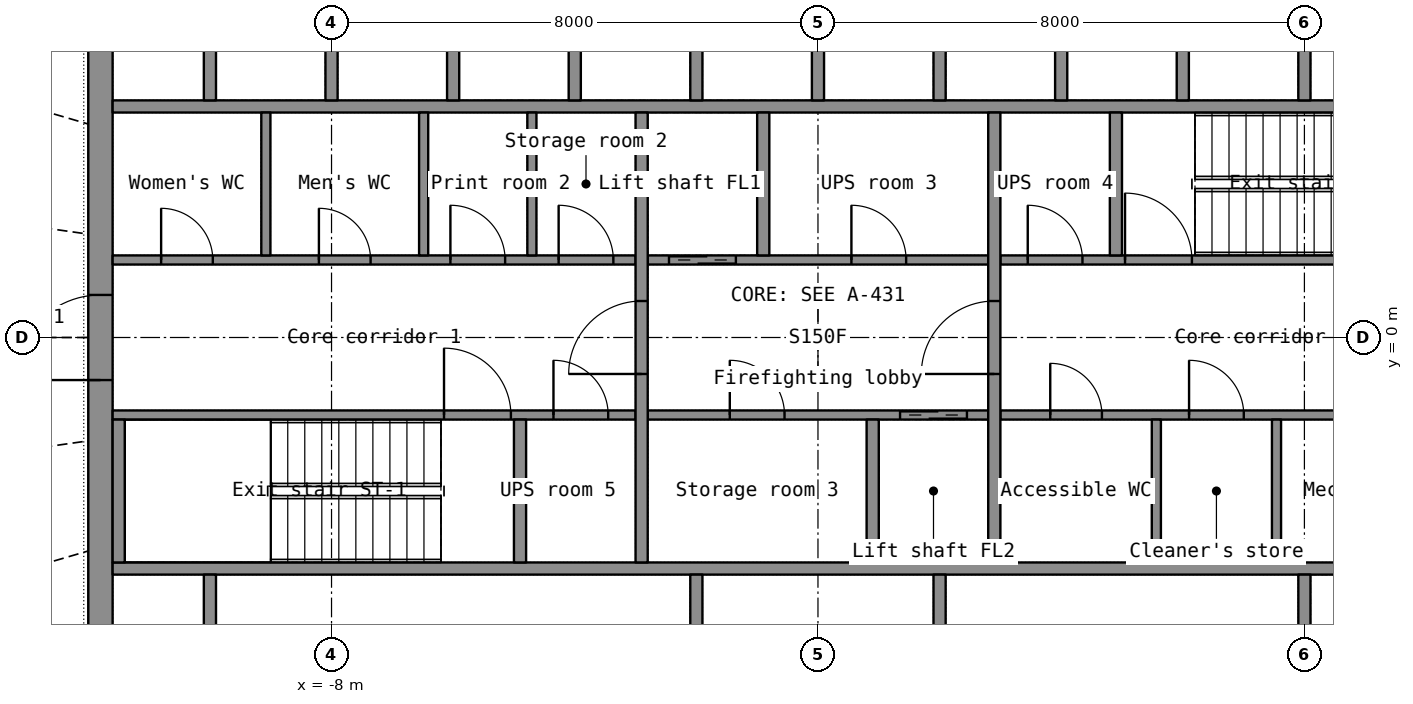
"""IFC4 building model, lengths in metres.
Left out: names, types, materials, properties, quantities, classifications, styles, units other than length and angle.
Written with IfcOpenShell. Run it as: python <this file> out.ifc"""

import sys

from ifc_helpers import new_model, si_unit, direction, frame, frame_2d, origin, place, context, subcontext, project, spatial, rectangle, extrude, element, fill, save


model = new_model("IFC4")
c1 = context("Model", 3, precision=1e-05, world=origin(), true_north=direction((0.0, 1.0)))
c2 = subcontext(c1, "Body", "Model", "MODEL_VIEW")
j1 = project(units=[si_unit("LENGTHUNIT", "METRE"), si_unit("PLANEANGLEUNIT", "RADIAN")], contexts=[c1])
p1 = place(None, origin())
s1 = spatial("IfcSite", under=j1, at=p1, CompositionType="ELEMENT")
p2 = place(p1, origin())
s2 = spatial("IfcBuilding", under=s1, at=p2, CompositionType="ELEMENT")
p3 = place(p2, frame((0.0, 0.0, 243.0)))
s3 = spatial("IfcBuildingStorey", under=s2, at=p3, CompositionType="ELEMENT", Elevation=243.0)
p4 = place(p3, frame((-11.8, -7.2, 0.0), z_axis=(0.0, 0.0, 1.0), x_axis=(0.0, 1.0, 0.0)))
e1 = element("IfcWall", 1, at=p4, inside=s3, PredefinedType="SHEAR", context=c2, shape_type="SweptSolid", body=[
    extrude(rectangle(XDim=14.4, YDim=0.4, at=frame_2d((7.2, 0.0))), origin(), (0.0, 0.0, 1.0), 3.3),
])
p5 = place(p4, frame((6.5, 0.0, 0.0)))
e2 = element("IfcOpeningElement", 2, at=p5, cuts=e1, PredefinedType="OPENING", context=c2, shape_type="SweptSolid", body=[
    extrude(rectangle(XDim=1.4, YDim=2.2, at=frame_2d((0.7, 1.1))), frame((0.0, 0.21, 0.0), z_axis=(0.0, -1.0, 0.0), x_axis=(1.0, 0.0, 0.0)), (0.0, 0.0, 1.0), 0.42),
])
for number, where, z_axis, x_axis in (
    (3, (-11.6, -3.8, 0.0), (0.0, 0.0, 1.0), (1.0, 0.0, 0.0)),
    (4, (-11.6, 3.8, 0.0), (0.0, 0.0, 1.0), (1.0, 0.0, 0.0)),
):
    element("IfcWall", number, at=place(p3, frame(where, z_axis=z_axis, x_axis=x_axis)), inside=s3, PredefinedType="SHEAR", context=c2, shape_type="SweptSolid", body=[
        extrude(rectangle(XDim=23.2, YDim=0.2, at=frame_2d((11.6, 0.0))), origin(), (0.0, 0.0, 1.0), 3.3),
    ])
for number, where, z_axis, x_axis in (
    (5, (-10.0, -6.8, 0.0), (0.0, 0.0, 1.0), (0.0, 1.0, 0.0)),
    (6, (8.0, -6.8, 0.0), (0.0, 0.0, 1.0), (0.0, 1.0, 0.0)),
):
    element("IfcWall", number, at=place(p3, frame(where, z_axis=z_axis, x_axis=x_axis)), inside=s3, PredefinedType="SHEAR", context=c2, shape_type="SweptSolid", body=[
        extrude(rectangle(XDim=2.9, YDim=0.2, at=frame_2d((1.45, 0.0))), origin(), (0.0, 0.0, 1.0), 3.3),
    ])
for number, where, z_axis, x_axis in (
    (7, (-2.0, -6.8, 0.0), (0.0, 0.0, 1.0), (0.0, 1.0, 0.0)),
    (8, (2.0, -6.8, 0.0), (0.0, 0.0, 1.0), (0.0, 1.0, 0.0)),
):
    element("IfcWall", number, at=place(p3, frame(where, z_axis=z_axis, x_axis=x_axis)), inside=s3, PredefinedType="PARTITIONING", context=c2, shape_type="SweptSolid", body=[
        extrude(rectangle(XDim=2.9, YDim=0.2, at=frame_2d((1.45, 0.0))), origin(), (0.0, 0.0, 1.0), 3.3),
    ])
for number, where, z_axis, x_axis in (
    (9, (-10.0, 3.9, 0.0), (0.0, 0.0, 1.0), (0.0, 1.0, 0.0)),
    (10, (-8.0, 3.9, 0.0), (0.0, 0.0, 1.0), (0.0, 1.0, 0.0)),
    (11, (-6.0, 3.9, 0.0), (0.0, 0.0, 1.0), (0.0, 1.0, 0.0)),
    (12, (-4.0, 3.9, 0.0), (0.0, 0.0, 1.0), (0.0, 1.0, 0.0)),
    (13, (-2.0, 3.9, 0.0), (0.0, 0.0, 1.0), (0.0, 1.0, 0.0)),
    (14, (0.0, 3.9, 0.0), (0.0, 0.0, 1.0), (0.0, 1.0, 0.0)),
    (15, (2.0, 3.9, 0.0), (0.0, 0.0, 1.0), (0.0, 1.0, 0.0)),
    (16, (4.0, 3.9, 0.0), (0.0, 0.0, 1.0), (0.0, 1.0, 0.0)),
    (17, (6.0, 3.9, 0.0), (0.0, 0.0, 1.0), (0.0, 1.0, 0.0)),
    (18, (8.0, 3.9, 0.0), (0.0, 0.0, 1.0), (0.0, 1.0, 0.0)),
):
    element("IfcWall", number, at=place(p3, frame(where, z_axis=z_axis, x_axis=x_axis)), inside=s3, PredefinedType="SHEAR", context=c2, shape_type="SweptSolid", body=[
        extrude(rectangle(XDim=2.9, YDim=0.2, at=frame_2d((1.45, 0.0))), origin(), (0.0, 0.0, 1.0), 3.3),
    ])
p6 = place(p3, frame((-11.6, -1.275, 0.0), z_axis=(0.0, 0.0, 1.0), x_axis=(1.0, 0.0, 0.0)))
e19 = element("IfcWall", 19, at=p6, inside=s3, PredefinedType="SHEAR", context=c2, shape_type="SweptSolid", body=[
    extrude(rectangle(XDim=8.6, YDim=0.15, at=frame_2d((4.3, 0.0))), origin(), (0.0, 0.0, 1.0), 3.3),
])
p7 = place(p6, frame((5.45, 0.0, 0.0)))
e20 = element("IfcOpeningElement", 20, at=p7, cuts=e19, PredefinedType="OPENING", context=c2, shape_type="SweptSolid", body=[
    extrude(rectangle(XDim=1.1, YDim=2.15, at=frame_2d((0.55, 1.075))), frame((0.0, 0.085, 0.0), z_axis=(0.0, -1.0, 0.0), x_axis=(1.0, 0.0, 0.0)), (0.0, 0.0, 1.0), 0.17),
])
p8 = place(p6, frame((7.25, 0.0, 0.0)))
e21 = element("IfcOpeningElement", 21, at=p8, cuts=e19, PredefinedType="OPENING", context=c2, shape_type="SweptSolid", body=[
    extrude(rectangle(XDim=0.9, YDim=2.1, at=frame_2d((0.45, 1.05))), frame((0.0, 0.085, 0.0), z_axis=(0.0, -1.0, 0.0), x_axis=(1.0, 0.0, 0.0)), (0.0, 0.0, 1.0), 0.17),
])
p9 = place(p3, frame((-2.8, -1.275, 0.0), z_axis=(0.0, 0.0, 1.0), x_axis=(1.0, 0.0, 0.0)))
e22 = element("IfcWall", 22, at=p9, inside=s3, PredefinedType="SHEAR", context=c2, shape_type="SweptSolid", body=[
    extrude(rectangle(XDim=5.6, YDim=0.15, at=frame_2d((2.8, 0.0))), origin(), (0.0, 0.0, 1.0), 3.3),
])
p10 = place(p9, frame((4.15, 0.0, 0.0)))
e23 = element("IfcOpeningElement", 23, at=p10, cuts=e22, PredefinedType="OPENING", context=c2, shape_type="SweptSolid", body=[
    extrude(rectangle(XDim=1.1, YDim=2.2, at=frame_2d((0.55, 1.1))), frame((0.0, 0.085, 0.0), z_axis=(0.0, -1.0, 0.0), x_axis=(1.0, 0.0, 0.0)), (0.0, 0.0, 1.0), 0.17),
])
p11 = place(p9, frame((1.35, 0.0, 0.0)))
e24 = element("IfcOpeningElement", 24, at=p11, cuts=e22, PredefinedType="OPENING", context=c2, shape_type="SweptSolid", body=[
    extrude(rectangle(XDim=0.9, YDim=2.1, at=frame_2d((0.45, 1.05))), frame((0.0, 0.085, 0.0), z_axis=(0.0, -1.0, 0.0), x_axis=(1.0, 0.0, 0.0)), (0.0, 0.0, 1.0), 0.17),
])
p12 = place(p3, frame((3.0, -1.275, 0.0), z_axis=(0.0, 0.0, 1.0), x_axis=(1.0, 0.0, 0.0)))
e25 = element("IfcWall", 25, at=p12, inside=s3, PredefinedType="PARTITIONING", context=c2, shape_type="SweptSolid", body=[
    extrude(rectangle(XDim=8.6, YDim=0.15, at=frame_2d((4.3, 0.0))), origin(), (0.0, 0.0, 1.0), 3.3),
])
p13 = place(p12, frame((0.82, 0.0, 0.0)))
e26 = element("IfcOpeningElement", 26, at=p13, cuts=e25, PredefinedType="OPENING", context=c2, shape_type="SweptSolid", body=[
    extrude(rectangle(XDim=0.85, YDim=2.1, at=frame_2d((0.425, 1.05))), frame((0.0, 0.085, 0.0), z_axis=(0.0, -1.0, 0.0), x_axis=(1.0, 0.0, 0.0)), (0.0, 0.0, 1.0), 0.17),
])
p14 = place(p12, frame((3.103, 0.0, 0.0)))
e27 = element("IfcOpeningElement", 27, at=p14, cuts=e25, PredefinedType="OPENING", context=c2, shape_type="SweptSolid", body=[
    extrude(rectangle(XDim=0.9, YDim=2.1, at=frame_2d((0.45, 1.05))), frame((0.0, 0.085, 0.0), z_axis=(0.0, -1.0, 0.0), x_axis=(1.0, 0.0, 0.0)), (0.0, 0.0, 1.0), 0.17),
])
p15 = place(p12, frame((6.158, 0.0, 0.0)))
e28 = element("IfcOpeningElement", 28, at=p15, cuts=e25, PredefinedType="OPENING", context=c2, shape_type="SweptSolid", body=[
    extrude(rectangle(XDim=0.9, YDim=2.1, at=frame_2d((0.45, 1.05))), frame((0.0, 0.085, 0.0), z_axis=(0.0, -1.0, 0.0), x_axis=(1.0, 0.0, 0.0)), (0.0, 0.0, 1.0), 0.17),
])
p16 = place(p3, frame((-11.6, 1.275, 0.0), z_axis=(0.0, 0.0, 1.0), x_axis=(1.0, 0.0, 0.0)))
e29 = element("IfcWall", 29, at=p16, inside=s3, PredefinedType="PARTITIONING", context=c2, shape_type="SweptSolid", body=[
    extrude(rectangle(XDim=8.6, YDim=0.15, at=frame_2d((4.3, 0.0))), origin(), (0.0, 0.0, 1.0), 3.3),
])
p17 = place(p16, frame((0.798, 0.0, 0.0)))
e30 = element("IfcOpeningElement", 30, at=p17, cuts=e29, PredefinedType="OPENING", context=c2, shape_type="SweptSolid", body=[
    extrude(rectangle(XDim=0.85, YDim=2.1, at=frame_2d((0.425, 1.05))), frame((0.0, 0.085, 0.0), z_axis=(0.0, -1.0, 0.0), x_axis=(1.0, 0.0, 0.0)), (0.0, 0.0, 1.0), 0.17),
])
p18 = place(p16, frame((3.393, 0.0, 0.0)))
e31 = element("IfcOpeningElement", 31, at=p18, cuts=e29, PredefinedType="OPENING", context=c2, shape_type="SweptSolid", body=[
    extrude(rectangle(XDim=0.85, YDim=2.1, at=frame_2d((0.425, 1.05))), frame((0.0, 0.085, 0.0), z_axis=(0.0, -1.0, 0.0), x_axis=(1.0, 0.0, 0.0)), (0.0, 0.0, 1.0), 0.17),
])
p19 = place(p16, frame((5.555, 0.0, 0.0)))
e32 = element("IfcOpeningElement", 32, at=p19, cuts=e29, PredefinedType="OPENING", context=c2, shape_type="SweptSolid", body=[
    extrude(rectangle(XDim=0.9, YDim=2.1, at=frame_2d((0.45, 1.05))), frame((0.0, 0.085, 0.0), z_axis=(0.0, -1.0, 0.0), x_axis=(1.0, 0.0, 0.0)), (0.0, 0.0, 1.0), 0.17),
])
p20 = place(p16, frame((7.335, 0.0, 0.0)))
e33 = element("IfcOpeningElement", 33, at=p20, cuts=e29, PredefinedType="OPENING", context=c2, shape_type="SweptSolid", body=[
    extrude(rectangle(XDim=0.9, YDim=2.1, at=frame_2d((0.45, 1.05))), frame((0.0, 0.085, 0.0), z_axis=(0.0, -1.0, 0.0), x_axis=(1.0, 0.0, 0.0)), (0.0, 0.0, 1.0), 0.17),
])
p21 = place(p3, frame((-2.8, 1.275, 0.0), z_axis=(0.0, 0.0, 1.0), x_axis=(1.0, 0.0, 0.0)))
e34 = element("IfcWall", 34, at=p21, inside=s3, PredefinedType="SHEAR", context=c2, shape_type="SweptSolid", body=[
    extrude(rectangle(XDim=5.6, YDim=0.15, at=frame_2d((2.8, 0.0))), origin(), (0.0, 0.0, 1.0), 3.3),
])
p22 = place(p21, frame((0.35, 0.0, 0.0)))
e35 = element("IfcOpeningElement", 35, at=p22, cuts=e34, PredefinedType="OPENING", context=c2, shape_type="SweptSolid", body=[
    extrude(rectangle(XDim=1.1, YDim=2.2, at=frame_2d((0.55, 1.1))), frame((0.0, 0.085, 0.0), z_axis=(0.0, -1.0, 0.0), x_axis=(1.0, 0.0, 0.0)), (0.0, 0.0, 1.0), 0.17),
])
p23 = place(p21, frame((3.35, 0.0, 0.0)))
e36 = element("IfcOpeningElement", 36, at=p23, cuts=e34, PredefinedType="OPENING", context=c2, shape_type="SweptSolid", body=[
    extrude(rectangle(XDim=0.9, YDim=2.1, at=frame_2d((0.45, 1.05))), frame((0.0, 0.085, 0.0), z_axis=(0.0, -1.0, 0.0), x_axis=(1.0, 0.0, 0.0)), (0.0, 0.0, 1.0), 0.17),
])
p24 = place(p3, frame((3.0, 1.275, 0.0), z_axis=(0.0, 0.0, 1.0), x_axis=(1.0, 0.0, 0.0)))
e37 = element("IfcWall", 37, at=p24, inside=s3, PredefinedType="SHEAR", context=c2, shape_type="SweptSolid", body=[
    extrude(rectangle(XDim=8.6, YDim=0.15, at=frame_2d((4.3, 0.0))), origin(), (0.0, 0.0, 1.0), 3.3),
])
p25 = place(p24, frame((2.05, 0.0, 0.0)))
e38 = element("IfcOpeningElement", 38, at=p25, cuts=e37, PredefinedType="OPENING", context=c2, shape_type="SweptSolid", body=[
    extrude(rectangle(XDim=1.1, YDim=2.15, at=frame_2d((0.55, 1.075))), frame((0.0, 0.085, 0.0), z_axis=(0.0, -1.0, 0.0), x_axis=(1.0, 0.0, 0.0)), (0.0, 0.0, 1.0), 0.17),
])
p26 = place(p24, frame((0.45, 0.0, 0.0)))
e39 = element("IfcOpeningElement", 39, at=p26, cuts=e37, PredefinedType="OPENING", context=c2, shape_type="SweptSolid", body=[
    extrude(rectangle(XDim=0.9, YDim=2.1, at=frame_2d((0.45, 1.05))), frame((0.0, 0.085, 0.0), z_axis=(0.0, -1.0, 0.0), x_axis=(1.0, 0.0, 0.0)), (0.0, 0.0, 1.0), 0.17),
])
p27 = place(p3, frame((-2.9, -3.7, 0.0), z_axis=(0.0, 0.0, 1.0), x_axis=(0.0, 1.0, 0.0)))
e40 = element("IfcWall", 40, at=p27, inside=s3, PredefinedType="SHEAR", context=c2, shape_type="SweptSolid", body=[
    extrude(rectangle(XDim=7.4, YDim=0.2, at=frame_2d((3.7, 0.0))), origin(), (0.0, 0.0, 1.0), 3.3),
])
p28 = place(p27, frame((3.1, 0.0, 0.0)))
e41 = element("IfcOpeningElement", 41, at=p28, cuts=e40, PredefinedType="OPENING", context=c2, shape_type="SweptSolid", body=[
    extrude(rectangle(XDim=1.2, YDim=2.2, at=frame_2d((0.6, 1.1))), frame((0.0, 0.11, 0.0), z_axis=(0.0, -1.0, 0.0), x_axis=(1.0, 0.0, 0.0)), (0.0, 0.0, 1.0), 0.22),
])
p29 = place(p3, frame((2.9, -3.7, 0.0), z_axis=(0.0, 0.0, 1.0), x_axis=(0.0, 1.0, 0.0)))
e42 = element("IfcWall", 42, at=p29, inside=s3, PredefinedType="SHEAR", context=c2, shape_type="SweptSolid", body=[
    extrude(rectangle(XDim=7.4, YDim=0.2, at=frame_2d((3.7, 0.0))), origin(), (0.0, 0.0, 1.0), 3.3),
])
p30 = place(p29, frame((3.1, 0.0, 0.0)))
e43 = element("IfcOpeningElement", 43, at=p30, cuts=e42, PredefinedType="OPENING", context=c2, shape_type="SweptSolid", body=[
    extrude(rectangle(XDim=1.2, YDim=2.2, at=frame_2d((0.6, 1.1))), frame((0.0, 0.11, 0.0), z_axis=(0.0, -1.0, 0.0), x_axis=(1.0, 0.0, 0.0)), (0.0, 0.0, 1.0), 0.22),
])
for number, where, z_axis, x_axis in (
    (44, (-0.9, 1.35, 0.0), (0.0, 0.0, 1.0), (0.0, 1.0, 0.0)),
    (45, (0.9, -3.7, 0.0), (0.0, 0.0, 1.0), (0.0, 1.0, 0.0)),
    (46, (-11.5, -3.7, 0.0), (0.0, 0.0, 1.0), (0.0, 1.0, 0.0)),
    (47, (-4.9, -3.7, 0.0), (0.0, 0.0, 1.0), (0.0, 1.0, 0.0)),
    (48, (4.9, 1.35, 0.0), (0.0, 0.0, 1.0), (0.0, 1.0, 0.0)),
):
    element("IfcWall", number, at=place(p3, frame(where, z_axis=z_axis, x_axis=x_axis)), inside=s3, PredefinedType="SHEAR", context=c2, shape_type="SweptSolid", body=[
        extrude(rectangle(XDim=2.35, YDim=0.2, at=frame_2d((1.175, 0.0))), origin(), (0.0, 0.0, 1.0), 3.3),
    ])
for number, where, z_axis, x_axis in (
    (49, (-9.08, 1.35, 0.0), (0.0, 0.0, 1.0), (0.0, 1.0, 0.0)),
    (50, (-6.485, 1.35, 0.0), (0.0, 0.0, 1.0), (0.0, 1.0, 0.0)),
    (51, (-4.705, 1.35, 0.0), (0.0, 0.0, 1.0), (0.0, 1.0, 0.0)),
    (52, (5.565, -3.7, 0.0), (0.0, 0.0, 1.0), (0.0, 1.0, 0.0)),
    (53, (7.541, -3.7, 0.0), (0.0, 0.0, 1.0), (0.0, 1.0, 0.0)),
):
    element("IfcWall", number, at=place(p3, frame(where, z_axis=z_axis, x_axis=x_axis)), inside=s3, PredefinedType="PARTITIONING", context=c2, shape_type="SweptSolid", body=[
        extrude(rectangle(XDim=2.35, YDim=0.15, at=frame_2d((1.175, 0.0))), origin(), (0.0, 0.0, 1.0), 3.3),
    ])
p31 = place(p5, origin())
e54 = element("IfcDoor", 54, at=p31, inside=s3, OperationType="DOUBLE_DOOR_SINGLE_SWING", PredefinedType="DOOR", context=c2, shape_type="SweptSolid", body=[
    extrude(rectangle(XDim=1.4, YDim=2.2, at=frame_2d((0.7, 1.1))), frame((0.0, 0.025, 0.0), z_axis=(0.0, -1.0, 0.0), x_axis=(1.0, 0.0, 0.0)), (0.0, 0.0, 1.0), 0.05),
])
fill(e2, e54)
p32 = place(p28, origin())
e55 = element("IfcDoor", 55, at=p32, inside=s3, OperationType="SINGLE_SWING_LEFT", PredefinedType="DOOR", context=c2, shape_type="SweptSolid", body=[
    extrude(rectangle(XDim=1.2, YDim=2.2, at=frame_2d((0.6, 1.1))), frame((0.0, 0.025, 0.0), z_axis=(0.0, -1.0, 0.0), x_axis=(1.0, 0.0, 0.0)), (0.0, 0.0, 1.0), 0.05),
])
fill(e41, e55)
p33 = place(p30, origin())
e56 = element("IfcDoor", 56, at=p33, inside=s3, OperationType="SINGLE_SWING_LEFT", PredefinedType="DOOR", context=c2, shape_type="SweptSolid", body=[
    extrude(rectangle(XDim=1.2, YDim=2.2, at=frame_2d((0.6, 1.1))), frame((0.0, 0.025, 0.0), z_axis=(0.0, -1.0, 0.0), x_axis=(1.0, 0.0, 0.0)), (0.0, 0.0, 1.0), 0.05),
])
fill(e43, e56)
p34 = place(p22, origin())
e57 = element("IfcDoor", 57, at=p34, inside=s3, OperationType="DOUBLE_DOOR_SLIDING", PredefinedType="DOOR", context=c2, shape_type="SweptSolid", body=[
    extrude(rectangle(XDim=1.1, YDim=2.2, at=frame_2d((0.55, 1.1))), frame((0.0, 0.025, 0.0), z_axis=(0.0, -1.0, 0.0), x_axis=(1.0, 0.0, 0.0)), (0.0, 0.0, 1.0), 0.05),
])
fill(e35, e57)
p35 = place(p10, origin())
e58 = element("IfcDoor", 58, at=p35, inside=s3, OperationType="DOUBLE_DOOR_SLIDING", PredefinedType="DOOR", context=c2, shape_type="SweptSolid", body=[
    extrude(rectangle(XDim=1.1, YDim=2.2, at=frame_2d((0.55, 1.1))), frame((0.0, 0.025, 0.0), z_axis=(0.0, -1.0, 0.0), x_axis=(1.0, 0.0, 0.0)), (0.0, 0.0, 1.0), 0.05),
])
fill(e23, e58)
p36 = place(p7, origin())
e59 = element("IfcDoor", 59, at=p36, inside=s3, OperationType="SINGLE_SWING_LEFT", PredefinedType="DOOR", context=c2, shape_type="SweptSolid", body=[
    extrude(rectangle(XDim=1.1, YDim=2.15, at=frame_2d((0.55, 1.075))), frame((0.0, 0.025, 0.0), z_axis=(0.0, -1.0, 0.0), x_axis=(1.0, 0.0, 0.0)), (0.0, 0.0, 1.0), 0.05),
])
fill(e20, e59)
p37 = place(p25, origin())
e60 = element("IfcDoor", 60, at=p37, inside=s3, OperationType="SINGLE_SWING_LEFT", PredefinedType="DOOR", context=c2, shape_type="SweptSolid", body=[
    extrude(rectangle(XDim=1.1, YDim=2.15, at=frame_2d((0.55, 1.075))), frame((0.0, 0.025, 0.0), z_axis=(0.0, -1.0, 0.0), x_axis=(1.0, 0.0, 0.0)), (0.0, 0.0, 1.0), 0.05),
])
fill(e38, e60)
p38 = place(p17, origin())
e61 = element("IfcDoor", 61, at=p38, inside=s3, OperationType="SINGLE_SWING_LEFT", PredefinedType="DOOR", context=c2, shape_type="SweptSolid", body=[
    extrude(rectangle(XDim=0.85, YDim=2.1, at=frame_2d((0.425, 1.05))), frame((0.0, 0.025, 0.0), z_axis=(0.0, -1.0, 0.0), x_axis=(1.0, 0.0, 0.0)), (0.0, 0.0, 1.0), 0.05),
])
fill(e30, e61)
p39 = place(p18, origin())
e62 = element("IfcDoor", 62, at=p39, inside=s3, OperationType="SINGLE_SWING_LEFT", PredefinedType="DOOR", context=c2, shape_type="SweptSolid", body=[
    extrude(rectangle(XDim=0.85, YDim=2.1, at=frame_2d((0.425, 1.05))), frame((0.0, 0.025, 0.0), z_axis=(0.0, -1.0, 0.0), x_axis=(1.0, 0.0, 0.0)), (0.0, 0.0, 1.0), 0.05),
])
fill(e31, e62)
p40 = place(p19, origin())
e63 = element("IfcDoor", 63, at=p40, inside=s3, OperationType="SINGLE_SWING_LEFT", PredefinedType="DOOR", context=c2, shape_type="SweptSolid", body=[
    extrude(rectangle(XDim=0.9, YDim=2.1, at=frame_2d((0.45, 1.05))), frame((0.0, 0.025, 0.0), z_axis=(0.0, -1.0, 0.0), x_axis=(1.0, 0.0, 0.0)), (0.0, 0.0, 1.0), 0.05),
])
fill(e32, e63)
p41 = place(p20, origin())
e64 = element("IfcDoor", 64, at=p41, inside=s3, OperationType="SINGLE_SWING_LEFT", PredefinedType="DOOR", context=c2, shape_type="SweptSolid", body=[
    extrude(rectangle(XDim=0.9, YDim=2.1, at=frame_2d((0.45, 1.05))), frame((0.0, 0.025, 0.0), z_axis=(0.0, -1.0, 0.0), x_axis=(1.0, 0.0, 0.0)), (0.0, 0.0, 1.0), 0.05),
])
fill(e33, e64)
p42 = place(p13, origin())
e65 = element("IfcDoor", 65, at=p42, inside=s3, OperationType="SINGLE_SWING_LEFT", PredefinedType="DOOR", context=c2, shape_type="SweptSolid", body=[
    extrude(rectangle(XDim=0.85, YDim=2.1, at=frame_2d((0.425, 1.05))), frame((0.0, 0.025, 0.0), z_axis=(0.0, -1.0, 0.0), x_axis=(1.0, 0.0, 0.0)), (0.0, 0.0, 1.0), 0.05),
])
fill(e26, e65)
p43 = place(p14, origin())
e66 = element("IfcDoor", 66, at=p43, inside=s3, OperationType="SINGLE_SWING_LEFT", PredefinedType="DOOR", context=c2, shape_type="SweptSolid", body=[
    extrude(rectangle(XDim=0.9, YDim=2.1, at=frame_2d((0.45, 1.05))), frame((0.0, 0.025, 0.0), z_axis=(0.0, -1.0, 0.0), x_axis=(1.0, 0.0, 0.0)), (0.0, 0.0, 1.0), 0.05),
])
fill(e27, e66)
p44 = place(p23, origin())
e67 = element("IfcDoor", 67, at=p44, inside=s3, OperationType="SINGLE_SWING_LEFT", PredefinedType="DOOR", context=c2, shape_type="SweptSolid", body=[
    extrude(rectangle(XDim=0.9, YDim=2.1, at=frame_2d((0.45, 1.05))), frame((0.0, 0.025, 0.0), z_axis=(0.0, -1.0, 0.0), x_axis=(1.0, 0.0, 0.0)), (0.0, 0.0, 1.0), 0.05),
])
fill(e36, e67)
p45 = place(p11, origin())
e68 = element("IfcDoor", 68, at=p45, inside=s3, OperationType="SINGLE_SWING_LEFT", PredefinedType="DOOR", context=c2, shape_type="SweptSolid", body=[
    extrude(rectangle(XDim=0.9, YDim=2.1, at=frame_2d((0.45, 1.05))), frame((0.0, 0.025, 0.0), z_axis=(0.0, -1.0, 0.0), x_axis=(1.0, 0.0, 0.0)), (0.0, 0.0, 1.0), 0.05),
])
fill(e24, e68)
p46 = place(p26, origin())
e69 = element("IfcDoor", 69, at=p46, inside=s3, OperationType="SINGLE_SWING_LEFT", PredefinedType="DOOR", context=c2, shape_type="SweptSolid", body=[
    extrude(rectangle(XDim=0.9, YDim=2.1, at=frame_2d((0.45, 1.05))), frame((0.0, 0.025, 0.0), z_axis=(0.0, -1.0, 0.0), x_axis=(1.0, 0.0, 0.0)), (0.0, 0.0, 1.0), 0.05),
])
fill(e39, e69)
p47 = place(p8, origin())
e70 = element("IfcDoor", 70, at=p47, inside=s3, OperationType="SINGLE_SWING_LEFT", PredefinedType="DOOR", context=c2, shape_type="SweptSolid", body=[
    extrude(rectangle(XDim=0.9, YDim=2.1, at=frame_2d((0.45, 1.05))), frame((0.0, 0.025, 0.0), z_axis=(0.0, -1.0, 0.0), x_axis=(1.0, 0.0, 0.0)), (0.0, 0.0, 1.0), 0.05),
])
fill(e21, e70)
save(model, sys.argv[1])
